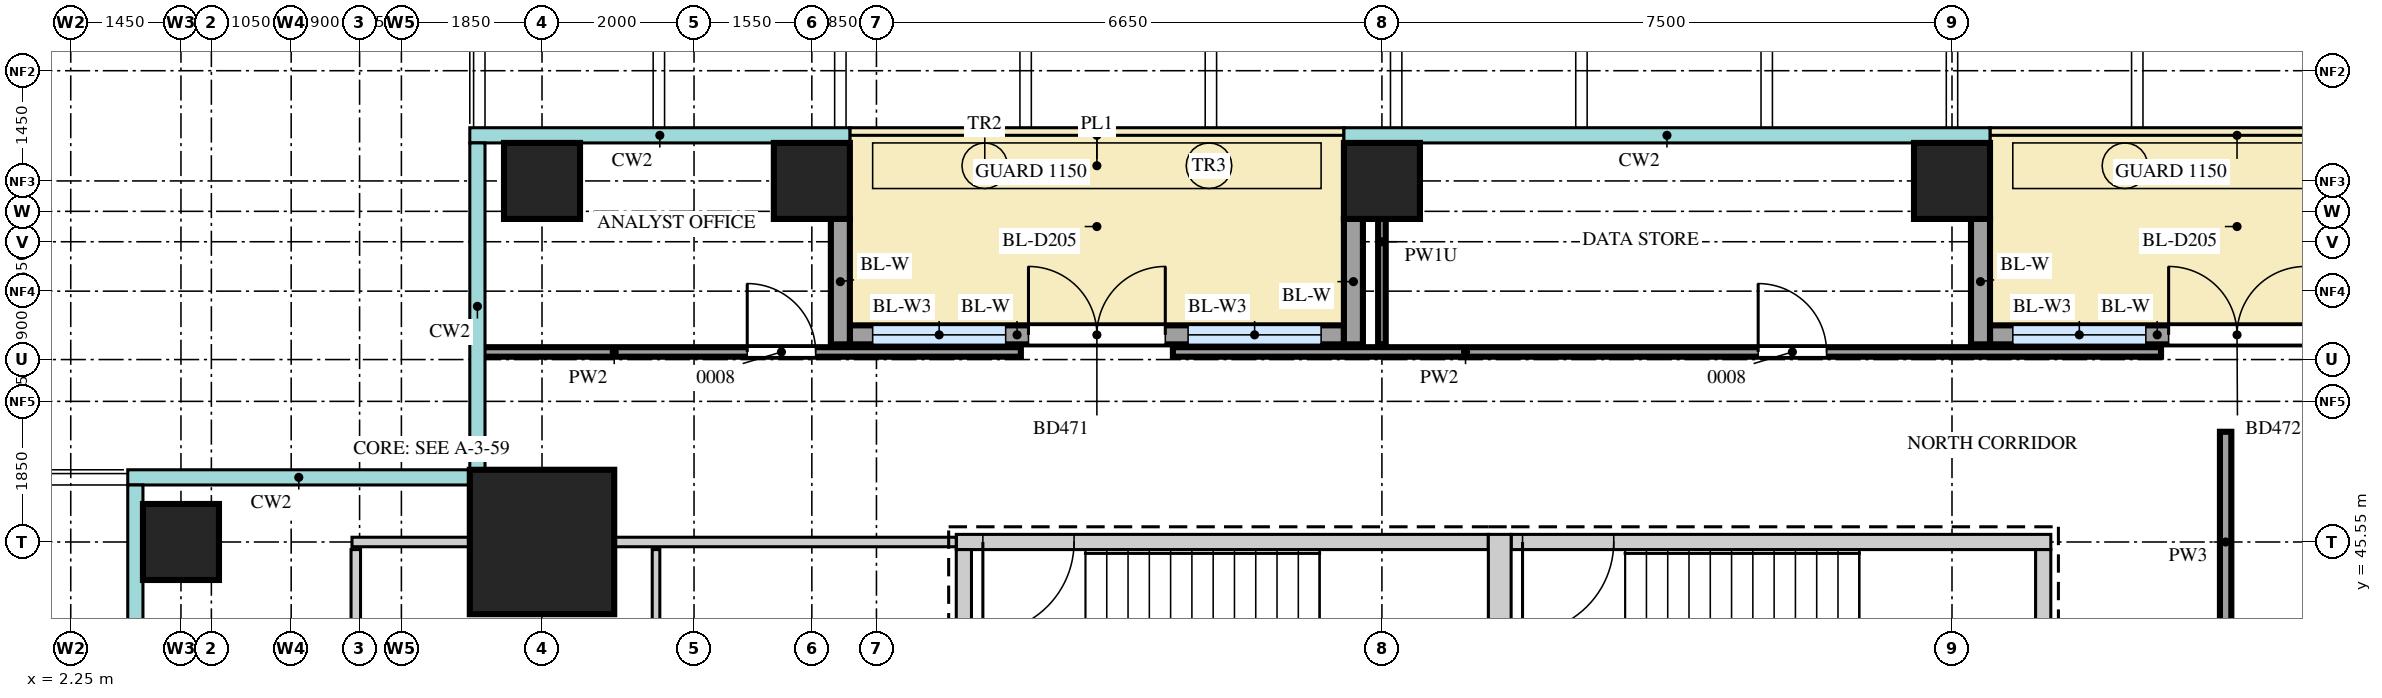
"""IFC4 building model, lengths in metres.
Left out: names, types, materials, properties, quantities, classifications, styles, units other than length and angle.
Written with IfcOpenShell. Run it as: python <this file> out.ifc"""

import sys

from ifc_helpers import new_model, si_unit, direction, frame, frame_2d, origin, origin_2d, place, context, subcontext, project, spatial, rectangle, extrude, source, transform, mapped, element, fill, save


model = new_model("IFC4")
c1 = context("Model", 3, precision=1e-05, world=origin(), true_north=direction((0.0, 1.0)))
c2 = subcontext(c1, "Body", "Model", "MODEL_VIEW")
j1 = project(units=[si_unit("LENGTHUNIT", "METRE"), si_unit("PLANEANGLEUNIT", "RADIAN")], contexts=[c1])
p1 = place(None, origin())
s1 = spatial("IfcSite", under=j1, at=p1, CompositionType="ELEMENT")
p2 = place(p1, origin())
s2 = spatial("IfcBuilding", under=s1, at=p2, CompositionType="ELEMENT")
p3 = place(p2, frame((0.0, 0.0, 212.7)))
s3 = spatial("IfcBuildingStorey", under=s2, at=p3, CompositionType="ELEMENT", Elevation=212.7)
m1 = source(origin(), c2, "Body", "SweptSolid", [
    extrude(rectangle(XDim=7.0, YDim=0.2, at=frame_2d((3.5, 0.0))), origin(), (0.0, 0.0, 1.0), 3.75),
])
p4 = place(p3, frame((13.9, 45.55, 0.0), z_axis=(0.0, 0.0, 1.0), x_axis=(1.0, 0.0, 0.0)))
e1 = element("IfcWall", 1, at=p4, inside=s3, PredefinedType="SHEAR", context=c2, shape_type="MappedRepresentation", body=[
    mapped(m1, transform((0.0, 0.0, 0.0))),
])
m2 = source(origin(), c2, "Body", "SweptSolid", [
    extrude(rectangle(XDim=1.2, YDim=2.1, at=frame_2d((0.6, 1.05))), frame((0.0, 0.11, 0.0), z_axis=(0.0, -1.0, 0.0), x_axis=(1.0, 0.0, 0.0)), (0.0, 0.0, 1.0), 0.22),
])
p5 = place(p4, frame((0.35, 0.0, 0.0)))
e2 = element("IfcOpeningElement", 2, at=p5, cuts=e1, PredefinedType="OPENING", context=c2, shape_type="MappedRepresentation", body=[
    mapped(m2, transform((0.0, 0.0, 0.0))),
])
m3 = source(origin(), c2, "Body", "SweptSolid", [
    extrude(rectangle(XDim=7.1, YDim=0.2, at=frame_2d((3.55, 0.0))), origin(), (0.0, 0.0, 1.0), 3.75),
])
p6 = place(p3, frame((21.2, 45.55, 0.0), z_axis=(0.0, 0.0, 1.0), x_axis=(1.0, 0.0, 0.0)))
e3 = element("IfcWall", 3, at=p6, inside=s3, PredefinedType="SHEAR", context=c2, shape_type="MappedRepresentation", body=[
    mapped(m3, transform((0.0, 0.0, 0.0))),
])
p7 = place(p6, frame((0.15, 0.0, 0.0)))
e4 = element("IfcOpeningElement", 4, at=p7, cuts=e3, PredefinedType="OPENING", context=c2, shape_type="MappedRepresentation", body=[
    mapped(m2, transform((0.0, 0.0, 0.0))),
])
m4 = source(origin(), c2, "Body", "SweptSolid", [
    extrude(rectangle(XDim=3.75, YDim=0.3, at=frame_2d((1.875, 0.0))), origin(), (0.0, 0.0, 1.0), 3.75),
])
p8 = place(p3, frame((21.05, 41.9, 0.0), z_axis=(0.0, 0.0, 1.0), x_axis=(0.0, 1.0, 0.0)))
e5 = element("IfcWall", 5, at=p8, inside=s3, PredefinedType="SHEAR", context=c2, shape_type="MappedRepresentation", body=[
    mapped(m4, transform((0.0, 0.0, 0.0))),
])
m5 = source(origin(), c2, "Body", "SweptSolid", [
    extrude(rectangle(XDim=3.35, YDim=0.2, at=frame_2d((1.675, 0.0))), origin(), (0.0, 0.0, 1.0), 3.75),
])
for number, where, z_axis, x_axis in (
    (6, (14.0, 42.1, 0.0), (0.0, 0.0, 1.0), (0.0, 1.0, 0.0)),
    (7, (28.2, 42.1, 0.0), (0.0, 0.0, 1.0), (0.0, 1.0, 0.0)),
):
    element("IfcWall", number, at=place(p3, frame(where, z_axis=z_axis, x_axis=x_axis)), inside=s3, PredefinedType="SHEAR", context=c2, shape_type="MappedRepresentation", body=[
        mapped(m5, transform((0.0, 0.0, 0.0))),
    ])
m6 = source(origin(), c2, "Body", "SweptSolid", [
    extrude(rectangle(XDim=1.9, YDim=1.9, at=origin_2d()), origin(), (0.0, 0.0, 1.0), 4.0),
])
p9 = place(p3, frame((8.45, 45.55, 0.0), z_axis=(0.0, 0.0, 1.0), x_axis=(1.0, 0.0, 0.0)))
e8 = element("IfcColumn", 8, at=p9, inside=s3, PredefinedType="COLUMN", context=c2, shape_type="MappedRepresentation", body=[
    mapped(m6, transform((0.0, 0.0, 0.0))),
])
m7 = source(origin(), c2, "Body", "SweptSolid", [
    extrude(rectangle(XDim=1.0, YDim=1.0, at=origin_2d()), origin(), (0.0, 0.0, 1.0), 4.0),
])
for number, where, z_axis, x_axis in (
    (9, (8.45, 50.3, 0.0), (0.0, 0.0, 1.0), (1.0, 0.0, 0.0)),
    (10, (12.0, 50.3, 0.0), (0.0, 0.0, 1.0), (1.0, 0.0, 0.0)),
    (11, (19.5, 50.3, 0.0), (0.0, 0.0, 1.0), (1.0, 0.0, 0.0)),
    (12, (27.0, 50.3, 0.0), (0.0, 0.0, 1.0), (1.0, 0.0, 0.0)),
    (13, (3.7, 45.55, 0.0), (0.0, 0.0, 1.0), (1.0, 0.0, 0.0)),
):
    element("IfcColumn", number, at=place(p3, frame(where, z_axis=z_axis, x_axis=x_axis)), inside=s3, PredefinedType="COLUMN", context=c2, shape_type="MappedRepresentation", body=[
        mapped(m7, transform((0.0, 0.0, 0.0))),
    ])
m8 = source(origin(), c2, "Body", "SweptSolid", [
    extrude(rectangle(XDim=6.5, YDim=0.25, at=frame_2d((3.25, 0.0))), origin(), (0.0, 0.0, 1.0), 3.75),
])
p10 = place(p3, frame((12.5, 48.275, 0.0), z_axis=(0.0, 0.0, 1.0), x_axis=(1.0, 0.0, 0.0)))
e14 = element("IfcWall", 14, at=p10, inside=s3, PredefinedType="SOLIDWALL", context=c2, shape_type="MappedRepresentation", body=[
    mapped(m8, transform((0.0, 0.0, 0.0))),
])
m9 = source(origin(), c2, "Body", "SweptSolid", [
    extrude(rectangle(XDim=1.75, YDim=2.4, at=frame_2d((0.875, 1.2))), frame((0.0, 0.135, 0.0), z_axis=(0.0, -1.0, 0.0), x_axis=(1.0, 0.0, 0.0)), (0.0, 0.0, 1.0), 0.27),
])
p11 = place(p10, frame((0.3, 0.0, 0.0)))
e15 = element("IfcOpeningElement", 15, at=p11, cuts=e14, PredefinedType="OPENING", context=c2, shape_type="MappedRepresentation", body=[
    mapped(m9, transform((0.0, 0.0, 0.0))),
])
p12 = place(p10, frame((4.45, 0.0, 0.0)))
e16 = element("IfcOpeningElement", 16, at=p12, cuts=e14, PredefinedType="OPENING", context=c2, shape_type="MappedRepresentation", body=[
    mapped(m9, transform((0.0, 0.0, 0.0))),
])
m10 = source(origin(), c2, "Body", "SweptSolid", [
    extrude(rectangle(XDim=1.8, YDim=2.4, at=frame_2d((0.9, 1.2))), frame((0.0, 0.135, 0.0), z_axis=(0.0, -1.0, 0.0), x_axis=(1.0, 0.0, 0.0)), (0.0, 0.0, 1.0), 0.27),
])
p13 = place(p10, frame((2.35, 0.0, 0.0)))
e17 = element("IfcOpeningElement", 17, at=p13, cuts=e14, PredefinedType="OPENING", context=c2, shape_type="MappedRepresentation", body=[
    mapped(m10, transform((0.0, 0.0, 0.0))),
])
m11 = source(origin(), c2, "Body", "SweptSolid", [
    extrude(rectangle(XDim=1.65, YDim=0.25, at=frame_2d((0.825, 0.0))), origin(), (0.0, 0.0, 1.0), 3.75),
])
for number, where, z_axis, x_axis in (
    (18, (12.375, 49.8, 0.0), (0.0, 0.0, 1.0), (0.0, -1.0, 0.0)),
    (19, (19.125, 49.8, 0.0), (0.0, 0.0, 1.0), (0.0, -1.0, 0.0)),
):
    element("IfcWall", number, at=place(p3, frame(where, z_axis=z_axis, x_axis=x_axis)), inside=s3, PredefinedType="SOLIDWALL", context=c2, shape_type="MappedRepresentation", body=[
        mapped(m11, transform((0.0, 0.0, 0.0))),
    ])
p14 = place(p3, frame((27.5, 48.275, 0.0), z_axis=(0.0, 0.0, 1.0), x_axis=(1.0, 0.0, 0.0)))
e20 = element("IfcWall", 20, at=p14, inside=s3, PredefinedType="SOLIDWALL", context=c2, shape_type="MappedRepresentation", body=[
    mapped(m8, transform((0.0, 0.0, 0.0))),
])
p15 = place(p14, frame((0.3, 0.0, 0.0)))
e21 = element("IfcOpeningElement", 21, at=p15, cuts=e20, PredefinedType="OPENING", context=c2, shape_type="MappedRepresentation", body=[
    mapped(m9, transform((0.0, 0.0, 0.0))),
])
p16 = place(p14, frame((4.45, 0.0, 0.0)))
e22 = element("IfcOpeningElement", 22, at=p16, cuts=e20, PredefinedType="OPENING", context=c2, shape_type="MappedRepresentation", body=[
    mapped(m9, transform((0.0, 0.0, 0.0))),
])
p17 = place(p14, frame((2.35, 0.0, 0.0)))
e23 = element("IfcOpeningElement", 23, at=p17, cuts=e20, PredefinedType="OPENING", context=c2, shape_type="MappedRepresentation", body=[
    mapped(m10, transform((0.0, 0.0, 0.0))),
])
p18 = place(p3, frame((27.375, 49.8, 0.0), z_axis=(0.0, 0.0, 1.0), x_axis=(0.0, -1.0, 0.0)))
e24 = element("IfcWall", 24, at=p18, inside=s3, PredefinedType="SOLIDWALL", context=c2, shape_type="MappedRepresentation", body=[
    mapped(m11, transform((0.0, 0.0, 0.0))),
])
m12 = source(origin(), c2, "Body", "SweptSolid", [
    extrude(rectangle(XDim=3.45, YDim=0.125, at=frame_2d((1.725, 0.0))), origin(), (0.0, 0.0, 1.0), 3.8),
])
p19 = place(p3, frame((6.0, 42.0, 0.0), z_axis=(0.0, 0.0, 1.0), x_axis=(0.0, 1.0, 0.0)))
e25 = element("IfcWall", 25, at=p19, inside=s3, PredefinedType="PARTITIONING", context=c2, shape_type="MappedRepresentation", body=[
    mapped(m12, transform((0.0, 0.0, 0.0))),
])
m13 = source(origin(), c2, "Body", "SweptSolid", [
    extrude(rectangle(XDim=3.45, YDim=0.1, at=frame_2d((1.725, 0.0))), origin(), (0.0, 0.0, 1.0), 3.8),
])
p20 = place(p3, frame((9.95, 42.0, 0.0), z_axis=(0.0, 0.0, 1.0), x_axis=(0.0, 1.0, 0.0)))
e26 = element("IfcWall", 26, at=p20, inside=s3, PredefinedType="PARTITIONING", context=c2, shape_type="MappedRepresentation", body=[
    mapped(m13, transform((0.0, 0.0, 0.0))),
])
m14 = source(origin(), c2, "Body", "SweptSolid", [
    extrude(rectangle(XDim=2.9, YDim=0.15, at=frame_2d((1.45, 0.0))), origin(), (0.0, 0.0, 1.0), 3.8),
])
p21 = place(p3, frame((30.6, 44.1, 0.0), z_axis=(0.0, 0.0, 1.0), x_axis=(0.0, 1.0, 0.0)))
e27 = element("IfcWall", 27, at=p21, inside=s3, PredefinedType="PARTITIONING", context=c2, shape_type="MappedRepresentation", body=[
    mapped(m14, transform((0.0, 0.0, 0.0))),
])
m15 = source(origin(), c2, "Body", "SweptSolid", [
    extrude(rectangle(XDim=7.95, YDim=0.125, at=frame_2d((3.975, 0.0))), origin(), (0.0, 0.0, 1.0), 3.1),
])
p22 = place(p3, frame((5.95, 45.55, 0.0), z_axis=(0.0, 0.0, 1.0), x_axis=(1.0, 0.0, 0.0)))
e28 = element("IfcWall", 28, at=p22, inside=s3, PredefinedType="PARTITIONING", context=c2, shape_type="MappedRepresentation", body=[
    mapped(m15, transform((0.0, 0.0, 0.0))),
])
m16 = source(origin(), c2, "Body", "SweptSolid", [
    extrude(rectangle(XDim=2.7, YDim=0.1, at=frame_2d((1.35, 0.0))), origin(), (0.0, 0.0, 1.0), 3.27),
])
p23 = place(p3, frame((19.5, 48.15, 0.0), z_axis=(0.0, 0.0, 1.0), x_axis=(0.0, 1.0, 0.0)))
e29 = element("IfcWall", 29, at=p23, inside=s3, PredefinedType="PARTITIONING", context=c2, shape_type="MappedRepresentation", body=[
    mapped(m16, transform((0.0, 0.0, 0.0))),
])
m17 = source(origin(), c2, "Body", "SweptSolid", [
    extrude(rectangle(XDim=7.1, YDim=0.125, at=frame_2d((3.55, 0.0))), origin(), (0.0, 0.0, 1.0), 3.8),
])
p24 = place(p3, frame((7.65, 48.05, 0.0), z_axis=(0.0, 0.0, 1.0), x_axis=(1.0, 0.0, 0.0)))
e30 = element("IfcWall", 30, at=p24, inside=s3, PredefinedType="PARTITIONING", context=c2, shape_type="MappedRepresentation", body=[
    mapped(m17, transform((0.0, 0.0, 0.0))),
])
m18 = source(origin(), c2, "Body", "SweptSolid", [
    extrude(rectangle(XDim=0.9, YDim=2.1, at=frame_2d((0.45, 1.05))), frame((0.0, 0.073, 0.0), z_axis=(0.0, -1.0, 0.0), x_axis=(1.0, 0.0, 0.0)), (0.0, 0.0, 1.0), 0.145),
])
p25 = place(p24, frame((3.5, 0.0, 0.0)))
e31 = element("IfcOpeningElement", 31, at=p25, cuts=e30, PredefinedType="OPENING", context=c2, shape_type="MappedRepresentation", body=[
    mapped(m18, transform((0.0, 0.0, 0.0))),
])
m19 = source(origin(), c2, "Body", "SweptSolid", [
    extrude(rectangle(XDim=13.0, YDim=0.125, at=frame_2d((6.5, 0.0))), origin(), (0.0, 0.0, 1.0), 3.8),
])
p26 = place(p3, frame((16.75, 48.05, 0.0), z_axis=(0.0, 0.0, 1.0), x_axis=(1.0, 0.0, 0.0)))
e32 = element("IfcWall", 32, at=p26, inside=s3, PredefinedType="PARTITIONING", context=c2, shape_type="MappedRepresentation", body=[
    mapped(m19, transform((0.0, 0.0, 0.0))),
])
p27 = place(p26, frame((7.7, 0.0, 0.0)))
e33 = element("IfcOpeningElement", 33, at=p27, cuts=e32, PredefinedType="OPENING", context=c2, shape_type="MappedRepresentation", body=[
    mapped(m18, transform((0.0, 0.0, 0.0))),
])
m20 = source(origin(), c2, "Body", "SweptSolid", [
    extrude(rectangle(XDim=1.75, YDim=2.4, at=frame_2d((0.875, 1.2))), frame((0.0, 0.03, 0.0), z_axis=(0.0, -1.0, 0.0), x_axis=(1.0, 0.0, 0.0)), (0.0, 0.0, 1.0), 0.06),
])
p28 = place(p11, origin())
e34 = element("IfcWindow", 34, at=p28, inside=s3, PartitioningType="SINGLE_PANEL", PredefinedType="WINDOW", context=c2, shape_type="MappedRepresentation", body=[
    mapped(m20, transform((0.0, 0.0, 0.0))),
])
fill(e15, e34)
p29 = place(p12, origin())
e35 = element("IfcWindow", 35, at=p29, inside=s3, PartitioningType="SINGLE_PANEL", PredefinedType="WINDOW", context=c2, shape_type="MappedRepresentation", body=[
    mapped(m20, transform((0.0, 0.0, 0.0))),
])
fill(e16, e35)
m21 = source(origin(), c2, "Body", "SweptSolid", [
    extrude(rectangle(XDim=1.8, YDim=2.4, at=frame_2d((0.9, 1.2))), frame((0.0, 0.025, 0.0), z_axis=(0.0, -1.0, 0.0), x_axis=(1.0, 0.0, 0.0)), (0.0, 0.0, 1.0), 0.05),
])
p30 = place(p13, origin())
e36 = element("IfcDoor", 36, at=p30, inside=s3, OperationType="DOUBLE_DOOR_DOUBLE_SWING", PredefinedType="DOOR", context=c2, shape_type="MappedRepresentation", body=[
    mapped(m21, transform((0.0, 0.0, 0.0))),
])
fill(e17, e36)
p31 = place(p15, origin())
e37 = element("IfcWindow", 37, at=p31, inside=s3, PartitioningType="SINGLE_PANEL", PredefinedType="WINDOW", context=c2, shape_type="MappedRepresentation", body=[
    mapped(m20, transform((0.0, 0.0, 0.0))),
])
fill(e21, e37)
p32 = place(p17, origin())
e38 = element("IfcDoor", 38, at=p32, inside=s3, OperationType="DOUBLE_DOOR_DOUBLE_SWING", PredefinedType="DOOR", context=c2, shape_type="MappedRepresentation", body=[
    mapped(m21, transform((0.0, 0.0, 0.0))),
])
fill(e23, e38)
m22 = source(origin(), c2, "Body", "SweptSolid", [
    extrude(rectangle(XDim=0.9, YDim=2.1, at=frame_2d((0.45, 1.05))), frame((0.0, 0.025, 0.0), z_axis=(0.0, -1.0, 0.0), x_axis=(1.0, 0.0, 0.0)), (0.0, 0.0, 1.0), 0.05),
])
p33 = place(p25, origin())
e39 = element("IfcDoor", 39, at=p33, inside=s3, OperationType="SINGLE_SWING_RIGHT", PredefinedType="DOOR", context=c2, shape_type="MappedRepresentation", body=[
    mapped(m22, transform((0.0, 0.0, 0.0))),
])
fill(e31, e39)
p34 = place(p27, origin())
e40 = element("IfcDoor", 40, at=p34, inside=s3, OperationType="SINGLE_SWING_RIGHT", PredefinedType="DOOR", context=c2, shape_type="MappedRepresentation", body=[
    mapped(m22, transform((0.0, 0.0, 0.0))),
])
fill(e33, e40)
m23 = source(origin(), c2, "Body", "SweptSolid", [
    extrude(rectangle(XDim=1.2, YDim=2.1, at=frame_2d((0.6, 1.05))), frame((0.0, 0.025, 0.0), z_axis=(0.0, -1.0, 0.0), x_axis=(1.0, 0.0, 0.0)), (0.0, 0.0, 1.0), 0.05),
])
p35 = place(p5, origin())
e41 = element("IfcDoor", 41, at=p35, inside=s3, OperationType="SINGLE_SWING_LEFT", PredefinedType="DOOR", context=c2, shape_type="MappedRepresentation", body=[
    mapped(m23, transform((0.0, 0.0, 0.0))),
])
fill(e2, e41)
p36 = place(p7, origin())
e42 = element("IfcDoor", 42, at=p36, inside=s3, OperationType="SINGLE_SWING_LEFT", PredefinedType="DOOR", context=c2, shape_type="MappedRepresentation", body=[
    mapped(m23, transform((0.0, 0.0, 0.0))),
])
fill(e4, e42)
save(model, sys.argv[1])
